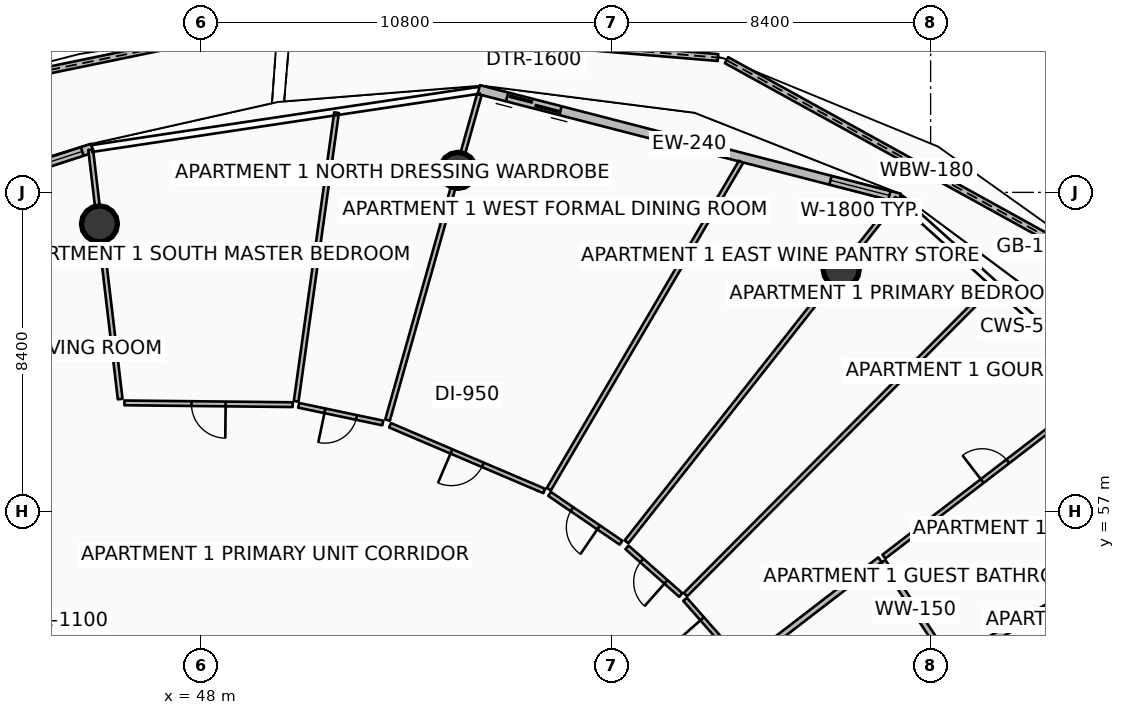
"""IFC4 building model, lengths in metres.
Left out: names, types, materials, properties, quantities, classifications, styles, units other than length and angle.
Written with IfcOpenShell. Run it as: python <this file> out.ifc"""

import sys

from ifc_helpers import new_model, si_unit, direction, frame, frame_2d, origin, origin_2d, place, context, subcontext, project, spatial, polyline, rectangle, circle, outline, extrude, element, fill, save


model = new_model("IFC4")
c1 = context("Model", 3, precision=1e-05, world=origin(), true_north=direction((0.0, 1.0)))
c2 = subcontext(c1, "Body", "Model", "MODEL_VIEW")
j1 = project(units=[si_unit("LENGTHUNIT", "METRE"), si_unit("PLANEANGLEUNIT", "RADIAN")], contexts=[c1])
p1 = place(None, origin())
s1 = spatial("IfcSite", under=j1, at=p1, CompositionType="ELEMENT")
p2 = place(p1, origin())
s2 = spatial("IfcBuilding", under=s1, at=p2, CompositionType="ELEMENT")
p3 = place(p2, frame((0.0, 0.0, 244.4)))
s3 = spatial("IfcBuildingStorey", under=s2, at=p3, CompositionType="ELEMENT", Elevation=244.4)
for number, where, z_axis, x_axis in (
    (1, (64.847, 63.371, 0.0), (0.0, 0.0, 1.0), (1.0, 0.0, 0.0)),
    (2, (54.763, 65.979, 0.0), (0.0, 0.0, 1.0), (1.0, 0.0, 0.0)),
    (3, (45.329, 64.571, 0.0), (0.0, 0.0, 1.0), (1.0, 0.0, 0.0)),
):
    element("IfcColumn", number, at=place(p3, frame(where, z_axis=z_axis, x_axis=x_axis)), inside=s3, PredefinedType="COLUMN", context=c2, shape_type="SweptSolid", body=[
        extrude(circle(Radius=0.475, at=origin_2d()), origin(), (0.0, 0.0, 1.0), 3.59),
    ])
p4 = place(p3, frame((72.361, 63.065, 0.0), z_axis=(0.0, 0.0, 1.0), x_axis=(-0.875454216257, 0.483301060663, 0.0)))
e4 = element("IfcWall", 4, at=p4, inside=s3, PredefinedType="PARAPET", context=c2, shape_type="SweptSolid", body=[
    extrude(outline(polyline([(0.0, 0.0), (12.029, 0.0), (12.029, 1.148), (6.015, 1.127), (0.0, 1.224), (0.0, 0.0)])), frame((0.0, 0.09, 0.0), z_axis=(0.0, -1.0, 0.0), x_axis=(1.0, 0.0, 0.0)), (0.0, 0.0, 1.0), 0.18),
])
p5 = place(p3, frame((61.605, 68.947, 0.0), z_axis=(0.0, 0.0, 1.0), x_axis=(-0.99651583667, 0.083403760507, 0.0)))
e5 = element("IfcWall", 5, at=p5, inside=s3, PredefinedType="PARAPET", context=c2, shape_type="SweptSolid", body=[
    extrude(outline(polyline([(0.0, 0.0), (11.279, 0.0), (11.278, 1.483), (5.639, 1.284), (0.0, 1.148), (0.0, 0.0)])), frame((0.0, 0.09, 0.0), z_axis=(0.0, -1.0, 0.0), x_axis=(1.0, 0.0, 0.0)), (0.0, 0.0, 1.0), 0.18),
])
p6 = place(p3, frame((50.021, 69.855, 0.0), z_axis=(0.0, 0.0, 1.0), x_axis=(-0.979472745479, -0.201576637692, 0.0)))
e6 = element("IfcWall", 6, at=p6, inside=s3, PredefinedType="PARAPET", context=c2, shape_type="SweptSolid", body=[
    extrude(outline(polyline([(0.0, 0.0), (10.475, 0.0), (10.476, 1.832), (5.238, 1.696), (0.0, 1.497), (0.0, 0.0)])), frame((0.0, 0.09, 0.0), z_axis=(0.0, -1.0, 0.0), x_axis=(1.0, 0.0, 0.0)), (0.0, 0.0, 1.0), 0.18),
])
p7 = place(p3, frame((66.386, 65.249, 0.0), z_axis=(0.0, 0.0, 1.0), x_axis=(-0.968343758421, 0.249620442927, 0.0)))
e7 = element("IfcWall", 7, at=p7, inside=s3, PredefinedType="SOLIDWALL", context=c2, shape_type="SweptSolid", body=[
    extrude(rectangle(XDim=11.438, YDim=0.24, at=frame_2d((5.719, 0.0))), origin(), (0.0, 0.0, 1.0), 2.54),
])
p8 = place(p7, frame((9.218, 0.0, 0.0)))
e8 = element("IfcOpeningElement", 8, at=p8, cuts=e7, PredefinedType="OPENING", context=c2, shape_type="SweptSolid", body=[
    extrude(rectangle(XDim=1.45, YDim=2.15, at=frame_2d((0.725, 1.075))), frame((0.0, 0.13, 0.0), z_axis=(0.0, -1.0, 0.0), x_axis=(1.0, 0.0, 0.0)), (0.0, 0.0, 1.0), 0.26),
])
p9 = place(p7, frame((0.28, 0.0, 0.65)))
e9 = element("IfcOpeningElement", 9, at=p9, cuts=e7, PredefinedType="OPENING", context=c2, shape_type="SweptSolid", body=[
    extrude(rectangle(XDim=1.6, YDim=1.5, at=frame_2d((0.8, 0.75))), frame((0.0, 0.13, 0.0), z_axis=(0.0, -1.0, 0.0), x_axis=(1.0, 0.0, 0.0)), (0.0, 0.0, 1.0), 0.26),
])
p10 = place(p3, frame((45.142, 66.564, 0.0), z_axis=(0.0, 0.0, 1.0), x_axis=(-0.951055974609, -0.309018661507, 0.0)))
e10 = element("IfcWall", 10, at=p10, inside=s3, PredefinedType="SOLIDWALL", context=c2, shape_type="SweptSolid", body=[
    extrude(rectangle(XDim=9.745, YDim=0.24, at=frame_2d((4.873, 0.0))), origin(), (0.0, 0.0, 1.0), 2.54),
])
p11 = place(p10, frame((7.525, 0.0, 0.0)))
e11 = element("IfcOpeningElement", 11, at=p11, cuts=e10, PredefinedType="OPENING", context=c2, shape_type="SweptSolid", body=[
    extrude(rectangle(XDim=1.45, YDim=2.15, at=frame_2d((0.725, 1.075))), frame((0.0, 0.13, 0.0), z_axis=(0.0, -1.0, 0.0), x_axis=(1.0, 0.0, 0.0)), (0.0, 0.0, 1.0), 0.26),
])
p12 = place(p10, frame((0.28, 0.0, 0.65)))
e12 = element("IfcOpeningElement", 12, at=p12, cuts=e10, PredefinedType="OPENING", context=c2, shape_type="SweptSolid", body=[
    extrude(rectangle(XDim=1.6, YDim=1.5, at=frame_2d((0.8, 0.75))), frame((0.0, 0.13, 0.0), z_axis=(0.0, -1.0, 0.0), x_axis=(1.0, 0.0, 0.0)), (0.0, 0.0, 1.0), 0.26),
])
p13 = place(p3, frame((59.796, 48.606, 0.0), z_axis=(0.0, 0.0, 1.0), x_axis=(0.872493213488, 0.488626229767, 0.0)))
e13 = element("IfcWall", 13, at=p13, inside=s3, PredefinedType="PARTITIONING", context=c2, shape_type="SweptSolid", body=[
    extrude(rectangle(XDim=16.91, YDim=0.18, at=frame_2d((8.455, 0.0))), origin(), (0.0, 0.0, 1.0), 2.957),
])
p14 = place(p3, frame((67.643, 53.115, 0.0), z_axis=(0.0, 0.0, 1.0), x_axis=(-0.550484224605, 0.834845565635, 0.0)))
e14 = element("IfcWall", 14, at=p14, inside=s3, PredefinedType="PARTITIONING", context=c2, shape_type="SweptSolid", body=[
    extrude(rectangle(XDim=3.079, YDim=0.15, at=frame_2d((1.54, 0.0))), origin(), (0.0, 0.0, 1.0), 2.957),
])
p15 = place(p3, frame((62.331, 53.018, 0.0), z_axis=(0.0, 0.0, 1.0), x_axis=(0.792803030826, 0.609477935871, 0.0)))
e15 = element("IfcWall", 15, at=p15, inside=s3, PredefinedType="PARTITIONING", context=c2, shape_type="SweptSolid", body=[
    extrude(rectangle(XDim=4.46, YDim=0.15, at=frame_2d((2.23, 0.0))), origin(), (0.0, 0.0, 1.0), 3.03),
])
p16 = place(p3, frame((65.97, 55.815, 0.0), z_axis=(0.0, 0.0, 1.0), x_axis=(0.792798660545, 0.609483620647, 0.0)))
e16 = element("IfcWall", 16, at=p16, inside=s3, PredefinedType="PARTITIONING", context=c2, shape_type="SweptSolid", body=[
    extrude(rectangle(XDim=7.377, YDim=0.125, at=frame_2d((3.688, 0.0))), origin(), (0.0, 0.0, 1.0), 3.03),
])
p17 = place(p16, frame((3.263, 0.0, 0.0)))
e17 = element("IfcOpeningElement", 17, at=p17, cuts=e16, PredefinedType="OPENING", context=c2, shape_type="SweptSolid", body=[
    extrude(rectangle(XDim=0.85, YDim=2.06, at=frame_2d((0.425, 1.03))), frame((0.0, 0.073, 0.0), z_axis=(0.0, -1.0, 0.0), x_axis=(1.0, 0.0, 0.0)), (0.0, 0.0, 1.0), 0.145),
])
p18 = place(p3, frame((60.749, 54.815, 0.0), z_axis=(0.0, 0.0, 1.0), x_axis=(0.705267705861, 0.708941085753, 0.0)))
e18 = element("IfcWall", 18, at=p18, inside=s3, PredefinedType="PARTITIONING", context=c2, shape_type="SweptSolid", body=[
    extrude(rectangle(XDim=11.498, YDim=0.125, at=frame_2d((5.749, 0.0))), origin(), (0.0, 0.0, 1.0), 3.03),
])
p19 = place(p3, frame((62.2, 53.031, 0.0), z_axis=(0.0, 0.0, 1.0), x_axis=(-0.660650282497, 0.750693815238, 0.0)))
e19 = element("IfcWall", 19, at=p19, inside=s3, PredefinedType="PARTITIONING", context=c2, shape_type="SweptSolid", body=[
    extrude(rectangle(XDim=2.212, YDim=0.125, at=frame_2d((1.106, 0.0))), origin(), (0.0, 0.0, 1.0), 3.03),
])
p20 = place(p19, frame((0.681, 0.0, 0.0)))
e20 = element("IfcOpeningElement", 20, at=p20, cuts=e19, PredefinedType="OPENING", context=c2, shape_type="SweptSolid", body=[
    extrude(rectangle(XDim=0.85, YDim=2.06, at=frame_2d((0.425, 1.03))), frame((0.0, 0.073, 0.0), z_axis=(0.0, -1.0, 0.0), x_axis=(1.0, 0.0, 0.0)), (0.0, 0.0, 1.0), 0.145),
])
p21 = place(p3, frame((60.626, 54.805, 0.0), z_axis=(0.0, 0.0, 1.0), x_axis=(-0.748419746602, 0.663225363581, 0.0)))
e21 = element("IfcWall", 21, at=p21, inside=s3, PredefinedType="PARTITIONING", context=c2, shape_type="SweptSolid", body=[
    extrude(rectangle(XDim=1.891, YDim=0.125, at=frame_2d((0.946, 0.0))), origin(), (0.0, 0.0, 1.0), 2.957),
])
p22 = place(p21, frame((0.521, 0.0, 0.0)))
e22 = element("IfcOpeningElement", 22, at=p22, cuts=e21, PredefinedType="OPENING", context=c2, shape_type="SweptSolid", body=[
    extrude(rectangle(XDim=0.85, YDim=2.06, at=frame_2d((0.425, 1.03))), frame((0.0, 0.073, 0.0), z_axis=(0.0, -1.0, 0.0), x_axis=(1.0, 0.0, 0.0)), (0.0, 0.0, 1.0), 0.145),
])
p23 = place(p3, frame((59.198, 56.204, 0.0), z_axis=(0.0, 0.0, 1.0), x_axis=(0.619101452742, 0.785311015593, 0.0)))
e23 = element("IfcWall", 23, at=p23, inside=s3, PredefinedType="PARTITIONING", context=c2, shape_type="SweptSolid", body=[
    extrude(rectangle(XDim=11.509, YDim=0.125, at=frame_2d((5.754, 0.0))), origin(), (0.0, 0.0, 1.0), 2.957),
])
p24 = place(p3, frame((57.153, 57.588, 0.0), z_axis=(0.0, 0.0, 1.0), x_axis=(0.506323477253, 0.862343630105, 0.0)))
e24 = element("IfcWall", 24, at=p24, inside=s3, PredefinedType="PARTITIONING", context=c2, shape_type="SweptSolid", body=[
    extrude(rectangle(XDim=9.988, YDim=0.125, at=frame_2d((4.994, 0.0))), origin(), (0.0, 0.0, 1.0), 3.03),
])
p25 = place(p3, frame((59.053, 56.182, 0.0), z_axis=(0.0, 0.0, 1.0), x_axis=(-0.825709590898, 0.56409544538, 0.0)))
e25 = element("IfcWall", 25, at=p25, inside=s3, PredefinedType="PARTITIONING", context=c2, shape_type="SweptSolid", body=[
    extrude(rectangle(XDim=2.276, YDim=0.125, at=frame_2d((1.138, 0.0))), origin(), (0.0, 0.0, 1.0), 2.957),
])
p26 = place(p25, frame((0.713, 0.0, 0.0)))
e26 = element("IfcOpeningElement", 26, at=p26, cuts=e25, PredefinedType="OPENING", context=c2, shape_type="SweptSolid", body=[
    extrude(rectangle(XDim=0.85, YDim=2.06, at=frame_2d((0.425, 1.03))), frame((0.0, 0.073, 0.0), z_axis=(0.0, -1.0, 0.0), x_axis=(1.0, 0.0, 0.0)), (0.0, 0.0, 1.0), 0.145),
])
p27 = place(p3, frame((57.034, 57.542, 0.0), z_axis=(0.0, 0.0, 1.0), x_axis=(-0.919921628857, 0.392102278445, 0.0)))
e27 = element("IfcWall", 27, at=p27, inside=s3, PredefinedType="PARTITIONING", context=c2, shape_type="SweptSolid", body=[
    extrude(rectangle(XDim=4.413, YDim=0.125, at=frame_2d((2.206, 0.0))), origin(), (0.0, 0.0, 1.0), 2.957),
])
p28 = place(p27, frame((1.756, 0.0, 0.0)))
e28 = element("IfcOpeningElement", 28, at=p28, cuts=e27, PredefinedType="OPENING", context=c2, shape_type="SweptSolid", body=[
    extrude(rectangle(XDim=0.9, YDim=2.08, at=frame_2d((0.45, 1.04))), frame((0.0, 0.073, 0.0), z_axis=(0.0, -1.0, 0.0), x_axis=(1.0, 0.0, 0.0)), (0.0, 0.0, 1.0), 0.145),
])
p29 = place(p3, frame((52.909, 59.408, 0.0), z_axis=(0.0, 0.0, 1.0), x_axis=(0.271454299549, 0.962451330331, 0.0)))
e29 = element("IfcWall", 29, at=p29, inside=s3, PredefinedType="PARTITIONING", context=c2, shape_type="SweptSolid", body=[
    extrude(rectangle(XDim=8.897, YDim=0.125, at=frame_2d((4.449, 0.0))), origin(), (0.0, 0.0, 1.0), 2.957),
])
p30 = place(p3, frame((45.874, 59.962, 0.0), z_axis=(0.0, 0.0, 1.0), x_axis=(-0.117533659592, 0.993068899353, 0.0)))
e30 = element("IfcWall", 30, at=p30, inside=s3, PredefinedType="PARTITIONING", context=c2, shape_type="SweptSolid", body=[
    extrude(rectangle(XDim=6.608, YDim=0.125, at=frame_2d((3.304, 0.0))), origin(), (0.0, 0.0, 1.0), 2.957),
])
p31 = place(p3, frame((50.505, 59.903, 0.0), z_axis=(0.0, 0.0, 1.0), x_axis=(0.138550424847, 0.990355380545, 0.0)))
e31 = element("IfcWall", 31, at=p31, inside=s3, PredefinedType="PARTITIONING", context=c2, shape_type="SweptSolid", body=[
    extrude(rectangle(XDim=7.669, YDim=0.125, at=frame_2d((3.834, 0.0))), origin(), (0.0, 0.0, 1.0), 3.03),
])
p32 = place(p3, frame((52.784, 59.332, 0.0), z_axis=(0.0, 0.0, 1.0), x_axis=(-0.978655016217, 0.205509997891, 0.0)))
e32 = element("IfcWall", 32, at=p32, inside=s3, PredefinedType="PARTITIONING", context=c2, shape_type="SweptSolid", body=[
    extrude(rectangle(XDim=2.262, YDim=0.125, at=frame_2d((1.131, 0.0))), origin(), (0.0, 0.0, 1.0), 2.957),
])
p33 = place(p32, frame((0.706, 0.0, 0.0)))
e33 = element("IfcOpeningElement", 33, at=p33, cuts=e32, PredefinedType="OPENING", context=c2, shape_type="SweptSolid", body=[
    extrude(rectangle(XDim=0.85, YDim=2.06, at=frame_2d((0.425, 1.03))), frame((0.0, 0.073, 0.0), z_axis=(0.0, -1.0, 0.0), x_axis=(1.0, 0.0, 0.0)), (0.0, 0.0, 1.0), 0.145),
])
p34 = place(p3, frame((50.412, 59.814, 0.0), z_axis=(0.0, 0.0, 1.0), x_axis=(-0.999943934923, 0.01058900422, 0.0)))
e34 = element("IfcWall", 34, at=p34, inside=s3, PredefinedType="PARTITIONING", context=c2, shape_type="SweptSolid", body=[
    extrude(rectangle(XDim=4.427, YDim=0.125, at=frame_2d((2.213, 0.0))), origin(), (0.0, 0.0, 1.0), 3.03),
])
p35 = place(p34, frame((1.763, 0.0, 0.0)))
e35 = element("IfcOpeningElement", 35, at=p35, cuts=e34, PredefinedType="OPENING", context=c2, shape_type="SweptSolid", body=[
    extrude(rectangle(XDim=0.9, YDim=2.08, at=frame_2d((0.45, 1.04))), frame((0.0, 0.073, 0.0), z_axis=(0.0, -1.0, 0.0), x_axis=(1.0, 0.0, 0.0)), (0.0, 0.0, 1.0), 0.145),
])
p36 = place(p8, origin())
e36 = element("IfcDoor", 36, at=p36, inside=s3, OperationType="DOUBLE_DOOR_SLIDING", PredefinedType="DOOR", context=c2, shape_type="SweptSolid", body=[
    extrude(rectangle(XDim=1.45, YDim=2.15, at=frame_2d((0.725, 1.075))), frame((0.0, 0.025, 0.0), z_axis=(0.0, -1.0, 0.0), x_axis=(1.0, 0.0, 0.0)), (0.0, 0.0, 1.0), 0.05),
])
fill(e8, e36)
p37 = place(p9, origin())
e37 = element("IfcWindow", 37, at=p37, inside=s3, PartitioningType="SINGLE_PANEL", PredefinedType="WINDOW", context=c2, shape_type="SweptSolid", body=[
    extrude(rectangle(XDim=1.6, YDim=1.5, at=frame_2d((0.8, 0.75))), frame((0.0, 0.03, 0.0), z_axis=(0.0, -1.0, 0.0), x_axis=(1.0, 0.0, 0.0)), (0.0, 0.0, 1.0), 0.06),
])
fill(e9, e37)
p38 = place(p12, origin())
e38 = element("IfcWindow", 38, at=p38, inside=s3, PartitioningType="SINGLE_PANEL", PredefinedType="WINDOW", context=c2, shape_type="SweptSolid", body=[
    extrude(rectangle(XDim=1.6, YDim=1.5, at=frame_2d((0.8, 0.75))), frame((0.0, 0.03, 0.0), z_axis=(0.0, -1.0, 0.0), x_axis=(1.0, 0.0, 0.0)), (0.0, 0.0, 1.0), 0.06),
])
fill(e12, e38)
p39 = place(p17, origin())
e39 = element("IfcDoor", 39, at=p39, inside=s3, OperationType="SINGLE_SWING_LEFT", PredefinedType="DOOR", context=c2, shape_type="SweptSolid", body=[
    extrude(rectangle(XDim=0.85, YDim=2.06, at=frame_2d((0.425, 1.03))), frame((0.0, 0.025, 0.0), z_axis=(0.0, -1.0, 0.0), x_axis=(1.0, 0.0, 0.0)), (0.0, 0.0, 1.0), 0.05),
])
fill(e17, e39)
p40 = place(p20, origin())
e40 = element("IfcDoor", 40, at=p40, inside=s3, OperationType="SINGLE_SWING_RIGHT", PredefinedType="DOOR", context=c2, shape_type="SweptSolid", body=[
    extrude(rectangle(XDim=0.85, YDim=2.06, at=frame_2d((0.425, 1.03))), frame((0.0, 0.025, 0.0), z_axis=(0.0, -1.0, 0.0), x_axis=(1.0, 0.0, 0.0)), (0.0, 0.0, 1.0), 0.05),
])
fill(e20, e40)
p41 = place(p22, origin())
e41 = element("IfcDoor", 41, at=p41, inside=s3, OperationType="SINGLE_SWING_LEFT", PredefinedType="DOOR", context=c2, shape_type="SweptSolid", body=[
    extrude(rectangle(XDim=0.85, YDim=2.06, at=frame_2d((0.425, 1.03))), frame((0.0, 0.025, 0.0), z_axis=(0.0, -1.0, 0.0), x_axis=(1.0, 0.0, 0.0)), (0.0, 0.0, 1.0), 0.05),
])
fill(e22, e41)
p42 = place(p26, origin())
e42 = element("IfcDoor", 42, at=p42, inside=s3, OperationType="SINGLE_SWING_LEFT", PredefinedType="DOOR", context=c2, shape_type="SweptSolid", body=[
    extrude(rectangle(XDim=0.85, YDim=2.06, at=frame_2d((0.425, 1.03))), frame((0.0, 0.025, 0.0), z_axis=(0.0, -1.0, 0.0), x_axis=(1.0, 0.0, 0.0)), (0.0, 0.0, 1.0), 0.05),
])
fill(e26, e42)
p43 = place(p28, origin())
e43 = element("IfcDoor", 43, at=p43, inside=s3, OperationType="SINGLE_SWING_RIGHT", PredefinedType="DOOR", context=c2, shape_type="SweptSolid", body=[
    extrude(rectangle(XDim=0.9, YDim=2.08, at=frame_2d((0.45, 1.04))), frame((0.0, 0.025, 0.0), z_axis=(0.0, -1.0, 0.0), x_axis=(1.0, 0.0, 0.0)), (0.0, 0.0, 1.0), 0.05),
])
fill(e28, e43)
p44 = place(p33, origin())
e44 = element("IfcDoor", 44, at=p44, inside=s3, OperationType="SINGLE_SWING_RIGHT", PredefinedType="DOOR", context=c2, shape_type="SweptSolid", body=[
    extrude(rectangle(XDim=0.85, YDim=2.06, at=frame_2d((0.425, 1.03))), frame((0.0, 0.025, 0.0), z_axis=(0.0, -1.0, 0.0), x_axis=(1.0, 0.0, 0.0)), (0.0, 0.0, 1.0), 0.05),
])
fill(e33, e44)
p45 = place(p35, origin())
e45 = element("IfcDoor", 45, at=p45, inside=s3, OperationType="SINGLE_SWING_LEFT", PredefinedType="DOOR", context=c2, shape_type="SweptSolid", body=[
    extrude(rectangle(XDim=0.9, YDim=2.08, at=frame_2d((0.45, 1.04))), frame((0.0, 0.025, 0.0), z_axis=(0.0, -1.0, 0.0), x_axis=(1.0, 0.0, 0.0)), (0.0, 0.0, 1.0), 0.05),
])
fill(e35, e45)
save(model, sys.argv[1])
